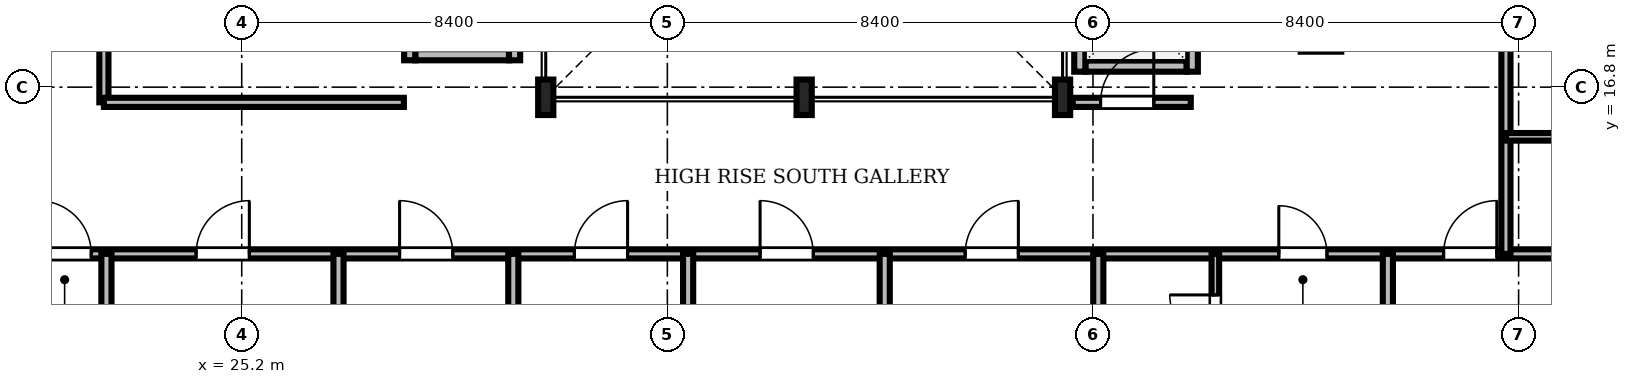
"""IFC4 building model, lengths in metres.
Left out: names, types, materials, properties, quantities, classifications, styles, units other than length and angle.
Written with IfcOpenShell. Run it as: python <this file> out.ifc"""

import sys

from ifc_helpers import new_model, si_unit, direction, frame, frame_2d, origin, origin_2d, place, context, subcontext, project, spatial, rectangle, i_section, extrude, source, transform, mapped, element, fill, save


model = new_model("IFC4")
c1 = context("Model", 3, precision=1e-05, world=origin(), true_north=direction((0.0, 1.0)))
c2 = subcontext(c1, "Body", "Model", "MODEL_VIEW")
j1 = project(units=[si_unit("LENGTHUNIT", "METRE"), si_unit("PLANEANGLEUNIT", "RADIAN")], contexts=[c1])
p1 = place(None, origin())
s1 = spatial("IfcSite", under=j1, at=p1, CompositionType="ELEMENT")
p2 = place(p1, origin())
s2 = spatial("IfcBuilding", under=s1, at=p2, CompositionType="ELEMENT")
p3 = place(p2, frame((0.0, 0.0, 181.0)))
s3 = spatial("IfcBuildingStorey", under=s2, at=p3, CompositionType="ELEMENT", Elevation=181.0)
m1 = source(origin(), c2, "Body", "SweptSolid", [
    extrude(i_section(OverallWidth=0.3, OverallDepth=0.7, WebThickness=0.017, FlangeThickness=0.032, FilletRadius=0.027, at=origin_2d()), origin(), (0.0, 0.0, 1.0), 3.58),
])
for number, where, z_axis, x_axis in (
    (1, (31.2, 16.6, 0.0), (0.0, 0.0, 1.0), (1.0, 0.0, 0.0)),
    (2, (36.3, 16.6, 0.0), (0.0, 0.0, 1.0), (1.0, 0.0, 0.0)),
    (3, (41.4, 16.6, 0.0), (0.0, 0.0, 1.0), (1.0, 0.0, 0.0)),
):
    element("IfcColumn", number, at=place(p3, frame(where, z_axis=z_axis, x_axis=x_axis)), inside=s3, PredefinedType="COLUMN", context=c2, shape_type="MappedRepresentation", body=[
        mapped(m1, transform((0.0, 0.0, 0.0), scale=1.0)),
    ])
m2 = source(origin(), c2, "Body", "SweptSolid", [
    extrude(rectangle(XDim=2.0, YDim=0.22, at=frame_2d((1.0, 0.0))), origin(), (0.0, 0.0, 1.0), 3.58),
])
p4 = place(p3, frame((41.85, 17.215, 0.0), z_axis=(0.0, 0.0, 1.0), x_axis=(1.0, 0.0, 0.0)))
e4 = element("IfcWall", 4, at=p4, inside=s3, PredefinedType="SOLIDWALL", context=c2, shape_type="MappedRepresentation", body=[
    mapped(m2, transform((0.0, 0.0, 0.0), scale=1.0)),
])
m3 = source(origin(), c2, "Body", "SweptSolid", [
    extrude(rectangle(XDim=2.19, YDim=0.22, at=frame_2d((1.095, 0.0))), origin(), (0.0, 0.0, 1.0), 3.58),
])
p5 = place(p3, frame((41.74, 17.105, 0.0), z_axis=(0.0, 0.0, 1.0), x_axis=(0.0, 1.0, 0.0)))
e5 = element("IfcWall", 5, at=p5, inside=s3, PredefinedType="SOLIDWALL", context=c2, shape_type="MappedRepresentation", body=[
    mapped(m3, transform((0.0, 0.0, 0.0), scale=1.0)),
])
p6 = place(p3, frame((43.96, 17.105, 0.0), z_axis=(0.0, 0.0, 1.0), x_axis=(0.0, 1.0, 0.0)))
e6 = element("IfcWall", 6, at=p6, inside=s3, PredefinedType="SOLIDWALL", context=c2, shape_type="MappedRepresentation", body=[
    mapped(m3, transform((0.0, 0.0, 0.0), scale=1.0)),
])
m4 = source(origin(), c2, "Body", "SweptSolid", [
    extrude(rectangle(XDim=1.1, YDim=2.2, at=frame_2d((0.55, 1.1))), frame((0.0, 0.12, 0.0), z_axis=(0.0, -1.0, 0.0), x_axis=(1.0, 0.0, 0.0)), (0.0, 0.0, 1.0), 0.24),
])
p7 = place(p6, frame((0.545, 0.0, 0.0)))
e7 = element("IfcOpeningElement", 7, at=p7, cuts=e6, PredefinedType="OPENING", context=c2, shape_type="MappedRepresentation", body=[
    mapped(m4, transform((0.0, 0.0, 0.0), scale=1.0)),
])
m5 = source(origin(), c2, "Body", "SweptSolid", [
    extrude(rectangle(XDim=1.85, YDim=0.22, at=frame_2d((0.925, 0.0))), origin(), (0.0, 0.0, 1.0), 3.022),
])
p8 = place(p3, frame((28.625, 17.44, 0.0), z_axis=(0.0, 0.0, 1.0), x_axis=(1.0, 0.0, 0.0)))
e8 = element("IfcWall", 8, at=p8, inside=s3, PredefinedType="SOLIDWALL", context=c2, shape_type="MappedRepresentation", body=[
    mapped(m5, transform((0.0, 0.0, 0.0), scale=1.0)),
])
m6 = source(origin(), c2, "Body", "SweptSolid", [
    extrude(rectangle(XDim=2.54, YDim=0.22, at=frame_2d((1.27, 0.0))), origin(), (0.0, 0.0, 1.0), 3.022),
])
p9 = place(p3, frame((28.515, 17.33, 0.0), z_axis=(0.0, 0.0, 1.0), x_axis=(0.0, 1.0, 0.0)))
e9 = element("IfcWall", 9, at=p9, inside=s3, PredefinedType="SOLIDWALL", context=c2, shape_type="MappedRepresentation", body=[
    mapped(m6, transform((0.0, 0.0, 0.0), scale=1.0)),
])
m7 = source(origin(), c2, "Body", "SweptSolid", [
    extrude(rectangle(XDim=2.54, YDim=0.22, at=frame_2d((1.27, 0.0))), origin(), (0.0, 0.0, 1.0), 3.58),
])
p10 = place(p3, frame((30.585, 17.33, 0.0), z_axis=(0.0, 0.0, 1.0), x_axis=(0.0, 1.0, 0.0)))
e10 = element("IfcWall", 10, at=p10, inside=s3, PredefinedType="SOLIDWALL", context=c2, shape_type="MappedRepresentation", body=[
    mapped(m7, transform((0.0, 0.0, 0.0), scale=1.0)),
])
m8 = source(origin(), c2, "Body", "SweptSolid", [
    extrude(rectangle(XDim=46.156, YDim=0.18, at=frame_2d((23.078, 0.0))), origin(), (0.0, 0.0, 1.0), 2.822),
])
p11 = place(p3, frame((11.422, 13.51, 0.0), z_axis=(0.0, 0.0, 1.0), x_axis=(1.0, 0.0, 0.0)))
e11 = element("IfcWall", 11, at=p11, inside=s3, PredefinedType="PARTITIONING", context=c2, shape_type="MappedRepresentation", body=[
    mapped(m8, transform((0.0, 0.0, 0.0), scale=1.0)),
])
m9 = source(origin(), c2, "Body", "SweptSolid", [
    extrude(rectangle(XDim=1.05, YDim=2.2, at=frame_2d((0.525, 1.1))), frame((0.0, 0.1, 0.0), z_axis=(0.0, -1.0, 0.0), x_axis=(1.0, 0.0, 0.0)), (0.0, 0.0, 1.0), 0.2),
])
p12 = place(p11, frame((9.758, 0.0, 0.0)))
e12 = element("IfcOpeningElement", 12, at=p12, cuts=e11, PredefinedType="OPENING", context=c2, shape_type="MappedRepresentation", body=[
    mapped(m9, transform((0.0, 0.0, 0.0), scale=1.0)),
])
p13 = place(p11, frame((12.878, 0.0, 0.0)))
e13 = element("IfcOpeningElement", 13, at=p13, cuts=e11, PredefinedType="OPENING", context=c2, shape_type="MappedRepresentation", body=[
    mapped(m9, transform((0.0, 0.0, 0.0), scale=1.0)),
])
p14 = place(p11, frame((16.893, 0.0, 0.0)))
e14 = element("IfcOpeningElement", 14, at=p14, cuts=e11, PredefinedType="OPENING", context=c2, shape_type="MappedRepresentation", body=[
    mapped(m9, transform((0.0, 0.0, 0.0), scale=1.0)),
])
p15 = place(p11, frame((20.344, 0.0, 0.0)))
e15 = element("IfcOpeningElement", 15, at=p15, cuts=e11, PredefinedType="OPENING", context=c2, shape_type="MappedRepresentation", body=[
    mapped(m9, transform((0.0, 0.0, 0.0), scale=1.0)),
])
p16 = place(p11, frame((24.008, 0.0, 0.0)))
e16 = element("IfcOpeningElement", 16, at=p16, cuts=e11, PredefinedType="OPENING", context=c2, shape_type="MappedRepresentation", body=[
    mapped(m9, transform((0.0, 0.0, 0.0), scale=1.0)),
])
p17 = place(p11, frame((28.055, 0.0, 0.0)))
e17 = element("IfcOpeningElement", 17, at=p17, cuts=e11, PredefinedType="OPENING", context=c2, shape_type="MappedRepresentation", body=[
    mapped(m9, transform((0.0, 0.0, 0.0), scale=1.0)),
])
m10 = source(origin(), c2, "Body", "SweptSolid", [
    extrude(rectangle(XDim=0.95, YDim=2.15, at=frame_2d((0.475, 1.075))), frame((0.0, 0.1, 0.0), z_axis=(0.0, -1.0, 0.0), x_axis=(1.0, 0.0, 0.0)), (0.0, 0.0, 1.0), 0.2),
])
p18 = place(p11, frame((34.246, 0.0, 0.0)))
e18 = element("IfcOpeningElement", 18, at=p18, cuts=e11, PredefinedType="OPENING", context=c2, shape_type="MappedRepresentation", body=[
    mapped(m10, transform((0.0, 0.0, 0.0), scale=1.0)),
])
p19 = place(p11, frame((37.498, 0.0, 0.0)))
e19 = element("IfcOpeningElement", 19, at=p19, cuts=e11, PredefinedType="OPENING", context=c2, shape_type="MappedRepresentation", body=[
    mapped(m9, transform((0.0, 0.0, 0.0), scale=1.0)),
])
m11 = source(origin(), c2, "Body", "SweptSolid", [
    extrude(rectangle(XDim=27.59, YDim=0.18, at=frame_2d((13.795, 0.0))), origin(), (0.0, 0.0, 1.0), 3.022),
])
p20 = place(p3, frame((50.15, 13.51, 0.0), z_axis=(0.0, 0.0, 1.0), x_axis=(0.0, 1.0, 0.0)))
e20 = element("IfcWall", 20, at=p20, inside=s3, PredefinedType="PARTITIONING", context=c2, shape_type="MappedRepresentation", body=[
    mapped(m11, transform((0.0, 0.0, 0.0), scale=1.0)),
])
p21 = place(p20, frame((4.086, 0.0, 0.0)))
e21 = element("IfcOpeningElement", 21, at=p21, cuts=e20, PredefinedType="OPENING", context=c2, shape_type="MappedRepresentation", body=[
    mapped(m9, transform((0.0, 0.0, 0.0), scale=1.0)),
])
p22 = place(p20, frame((9.744, 0.0, 0.0)))
e22 = element("IfcOpeningElement", 22, at=p22, cuts=e20, PredefinedType="OPENING", context=c2, shape_type="MappedRepresentation", body=[
    mapped(m9, transform((0.0, 0.0, 0.0), scale=1.0)),
])
p23 = place(p20, frame((17.771, 0.0, 0.0)))
e23 = element("IfcOpeningElement", 23, at=p23, cuts=e20, PredefinedType="OPENING", context=c2, shape_type="MappedRepresentation", body=[
    mapped(m9, transform((0.0, 0.0, 0.0), scale=1.0)),
])
p24 = place(p20, frame((24.614, 0.0, 0.0)))
e24 = element("IfcOpeningElement", 24, at=p24, cuts=e20, PredefinedType="OPENING", context=c2, shape_type="MappedRepresentation", body=[
    mapped(m9, transform((0.0, 0.0, 0.0), scale=1.0)),
])
m12 = source(origin(), c2, "Body", "SweptSolid", [
    extrude(rectangle(XDim=5.4, YDim=0.18, at=frame_2d((2.7, 0.0))), origin(), (0.0, 0.0, 1.0), 3.022),
])
p25 = place(p3, frame((22.48, 16.5, 0.0), z_axis=(0.0, 0.0, 1.0), x_axis=(0.0, 1.0, 0.0)))
e25 = element("IfcWall", 25, at=p25, inside=s3, PredefinedType="PARTITIONING", context=c2, shape_type="MappedRepresentation", body=[
    mapped(m12, transform((0.0, 0.0, 0.0), scale=1.0)),
])
p26 = place(p25, frame((2.0, 0.0, 0.0)))
e26 = element("IfcOpeningElement", 26, at=p26, cuts=e25, PredefinedType="OPENING", context=c2, shape_type="MappedRepresentation", body=[
    mapped(m9, transform((0.0, 0.0, 0.0), scale=1.0)),
])
m13 = source(origin(), c2, "Body", "SweptSolid", [
    extrude(rectangle(XDim=2.36, YDim=0.15, at=frame_2d((1.18, 0.0))), origin(), (0.0, 0.0, 1.0), 3.242),
])
p27 = place(p3, frame((44.415, 11.15, 0.0), z_axis=(0.0, 0.0, 1.0), x_axis=(0.0, 1.0, 0.0)))
e27 = element("IfcWall", 27, at=p27, inside=s3, PredefinedType="PARTITIONING", context=c2, shape_type="MappedRepresentation", body=[
    mapped(m13, transform((0.0, 0.0, 0.0), scale=1.0)),
])
m14 = source(origin(), c2, "Body", "SweptSolid", [
    extrude(rectangle(XDim=0.9, YDim=2.1, at=frame_2d((0.45, 1.05))), frame((0.0, 0.085, 0.0), z_axis=(0.0, -1.0, 0.0), x_axis=(1.0, 0.0, 0.0)), (0.0, 0.0, 1.0), 0.17),
])
p28 = place(p27, frame((0.65, 0.0, 0.0)))
e28 = element("IfcOpeningElement", 28, at=p28, cuts=e27, PredefinedType="OPENING", context=c2, shape_type="MappedRepresentation", body=[
    mapped(m14, transform((0.0, 0.0, 0.0), scale=1.0)),
])
m15 = source(origin(), c2, "Body", "SweptSolid", [
    extrude(rectangle(XDim=2.33, YDim=0.18, at=frame_2d((1.165, 0.0))), origin(), (0.0, 0.0, 1.0), 3.022),
])
p29 = place(p3, frame((41.6, 16.5, 0.0), z_axis=(0.0, 0.0, 1.0), x_axis=(1.0, 0.0, 0.0)))
e29 = element("IfcWall", 29, at=p29, inside=s3, PredefinedType="PARTITIONING", context=c2, shape_type="MappedRepresentation", body=[
    mapped(m15, transform((0.0, 0.0, 0.0), scale=1.0)),
])
p30 = place(p29, frame((0.55, 0.0, 0.0)))
e30 = element("IfcOpeningElement", 30, at=p30, cuts=e29, PredefinedType="OPENING", context=c2, shape_type="MappedRepresentation", body=[
    mapped(m9, transform((0.0, 0.0, 0.0), scale=1.0)),
])
m16 = source(origin(), c2, "Body", "SweptSolid", [
    extrude(rectangle(XDim=11.388, YDim=0.2, at=frame_2d((5.694, 0.0))), origin(), (0.0, 0.0, 1.0), 2.822),
])
for number, where, z_axis, x_axis in (
    (31, (22.53, 2.122, 0.0), (0.0, 0.0, 1.0), (0.0, 1.0, 0.0)),
    (32, (27.11, 2.122, 0.0), (0.0, 0.0, 1.0), (0.0, 1.0, 0.0)),
    (33, (30.56, 2.122, 0.0), (0.0, 0.0, 1.0), (0.0, 1.0, 0.0)),
):
    element("IfcWall", number, at=place(p3, frame(where, z_axis=z_axis, x_axis=x_axis)), inside=s3, PredefinedType="PARTITIONING", context=c2, shape_type="MappedRepresentation", body=[
        mapped(m16, transform((0.0, 0.0, 0.0), scale=1.0)),
    ])
m17 = source(origin(), c2, "Body", "SweptSolid", [
    extrude(rectangle(XDim=11.58, YDim=0.2, at=frame_2d((5.79, 0.0))), origin(), (0.0, 0.0, 1.0), 2.822),
])
p31 = place(p3, frame((34.01, 1.93, 0.0), z_axis=(0.0, 0.0, 1.0), x_axis=(0.0, 1.0, 0.0)))
e34 = element("IfcWall", 34, at=p31, inside=s3, PredefinedType="PARTITIONING", context=c2, shape_type="MappedRepresentation", body=[
    mapped(m17, transform((0.0, 0.0, 0.0), scale=1.0)),
])
for number, where, z_axis, x_axis in (
    (35, (37.89, 2.122, 0.0), (0.0, 0.0, 1.0), (0.0, 1.0, 0.0)),
    (36, (42.105, 2.122, 0.0), (0.0, 0.0, 1.0), (0.0, 1.0, 0.0)),
    (37, (47.82, 2.122, 0.0), (0.0, 0.0, 1.0), (0.0, 1.0, 0.0)),
):
    element("IfcWall", number, at=place(p3, frame(where, z_axis=z_axis, x_axis=x_axis)), inside=s3, PredefinedType="PARTITIONING", context=c2, shape_type="MappedRepresentation", body=[
        mapped(m16, transform((0.0, 0.0, 0.0), scale=1.0)),
    ])
m18 = source(origin(), c2, "Body", "SweptSolid", [
    extrude(rectangle(XDim=5.92, YDim=0.18, at=frame_2d((2.96, 0.0))), origin(), (0.0, 0.0, 1.0), 3.58),
])
p32 = place(p3, frame((22.48, 16.5, 0.0), z_axis=(0.0, 0.0, 1.0), x_axis=(1.0, 0.0, 0.0)))
e38 = element("IfcWall", 38, at=p32, inside=s3, PredefinedType="PARTITIONING", context=c2, shape_type="MappedRepresentation", body=[
    mapped(m18, transform((0.0, 0.0, 0.0), scale=1.0)),
])
m19 = source(origin(), c2, "Body", "SweptSolid", [
    extrude(rectangle(XDim=2.36, YDim=0.15, at=frame_2d((1.18, 0.0))), origin(), (0.0, 0.0, 1.0), 3.58),
])
p33 = place(p3, frame((50.15, 15.82, 0.0), z_axis=(0.0, 0.0, 1.0), x_axis=(1.0, 0.0, 0.0)))
e39 = element("IfcWall", 39, at=p33, inside=s3, PredefinedType="PARTITIONING", context=c2, shape_type="MappedRepresentation", body=[
    mapped(m19, transform((0.0, 0.0, 0.0), scale=1.0)),
])
m20 = source(origin(), c2, "Body", "SweptSolid", [
    extrude(rectangle(XDim=1.05, YDim=2.2, at=frame_2d((0.525, 1.1))), frame((0.0, 0.025, 0.0), z_axis=(0.0, -1.0, 0.0), x_axis=(1.0, 0.0, 0.0)), (0.0, 0.0, 1.0), 0.05),
])
p34 = place(p12, origin())
e40 = element("IfcDoor", 40, at=p34, inside=s3, OperationType="SINGLE_SWING_LEFT", PredefinedType="DOOR", context=c2, shape_type="MappedRepresentation", body=[
    mapped(m20, transform((0.0, 0.0, 0.0), scale=1.0)),
])
fill(e12, e40)
p35 = place(p13, origin())
e41 = element("IfcDoor", 41, at=p35, inside=s3, OperationType="SINGLE_SWING_RIGHT", PredefinedType="DOOR", context=c2, shape_type="MappedRepresentation", body=[
    mapped(m20, transform((0.0, 0.0, 0.0), scale=1.0)),
])
fill(e13, e41)
p36 = place(p14, origin())
e42 = element("IfcDoor", 42, at=p36, inside=s3, OperationType="SINGLE_SWING_LEFT", PredefinedType="DOOR", context=c2, shape_type="MappedRepresentation", body=[
    mapped(m20, transform((0.0, 0.0, 0.0), scale=1.0)),
])
fill(e14, e42)
p37 = place(p15, origin())
e43 = element("IfcDoor", 43, at=p37, inside=s3, OperationType="SINGLE_SWING_RIGHT", PredefinedType="DOOR", context=c2, shape_type="MappedRepresentation", body=[
    mapped(m20, transform((0.0, 0.0, 0.0), scale=1.0)),
])
fill(e15, e43)
p38 = place(p16, origin())
e44 = element("IfcDoor", 44, at=p38, inside=s3, OperationType="SINGLE_SWING_LEFT", PredefinedType="DOOR", context=c2, shape_type="MappedRepresentation", body=[
    mapped(m20, transform((0.0, 0.0, 0.0), scale=1.0)),
])
fill(e16, e44)
p39 = place(p17, origin())
e45 = element("IfcDoor", 45, at=p39, inside=s3, OperationType="SINGLE_SWING_RIGHT", PredefinedType="DOOR", context=c2, shape_type="MappedRepresentation", body=[
    mapped(m20, transform((0.0, 0.0, 0.0), scale=1.0)),
])
fill(e17, e45)
m21 = source(origin(), c2, "Body", "SweptSolid", [
    extrude(rectangle(XDim=0.95, YDim=2.15, at=frame_2d((0.475, 1.075))), frame((0.0, 0.025, 0.0), z_axis=(0.0, -1.0, 0.0), x_axis=(1.0, 0.0, 0.0)), (0.0, 0.0, 1.0), 0.05),
])
p40 = place(p18, origin())
e46 = element("IfcDoor", 46, at=p40, inside=s3, OperationType="SINGLE_SWING_LEFT", PredefinedType="DOOR", context=c2, shape_type="MappedRepresentation", body=[
    mapped(m21, transform((0.0, 0.0, 0.0), scale=1.0)),
])
fill(e18, e46)
p41 = place(p19, origin())
e47 = element("IfcDoor", 47, at=p41, inside=s3, OperationType="SINGLE_SWING_RIGHT", PredefinedType="DOOR", context=c2, shape_type="MappedRepresentation", body=[
    mapped(m20, transform((0.0, 0.0, 0.0), scale=1.0)),
])
fill(e19, e47)
m22 = source(origin(), c2, "Body", "SweptSolid", [
    extrude(rectangle(XDim=0.9, YDim=2.1, at=frame_2d((0.45, 1.05))), frame((0.0, 0.025, 0.0), z_axis=(0.0, -1.0, 0.0), x_axis=(1.0, 0.0, 0.0)), (0.0, 0.0, 1.0), 0.05),
])
p42 = place(p28, origin())
e48 = element("IfcDoor", 48, at=p42, inside=s3, OperationType="SINGLE_SWING_RIGHT", PredefinedType="DOOR", context=c2, shape_type="MappedRepresentation", body=[
    mapped(m22, transform((0.0, 0.0, 0.0), scale=1.0)),
])
fill(e28, e48)
p43 = place(p30, origin())
e49 = element("IfcDoor", 49, at=p43, inside=s3, OperationType="SINGLE_SWING_RIGHT", PredefinedType="DOOR", context=c2, shape_type="MappedRepresentation", body=[
    mapped(m20, transform((0.0, 0.0, 0.0), scale=1.0)),
])
fill(e30, e49)
save(model, sys.argv[1])
